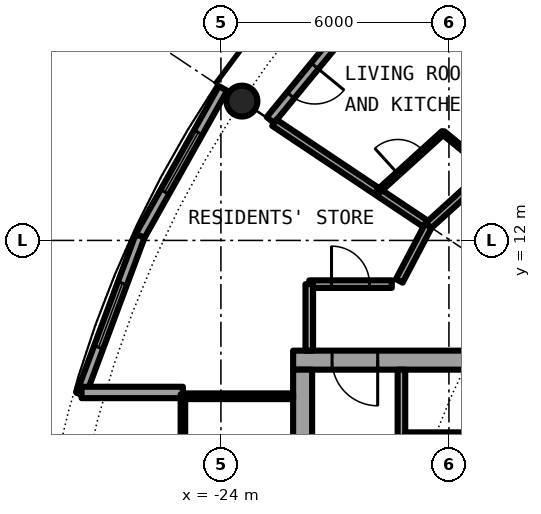
"""IFC4 building model, lengths in metres.
Left out: names, types, materials, properties, quantities, classifications, styles, units other than length and angle.
Written with IfcOpenShell. Run it as: python <this file> out.ifc"""

import sys

from ifc_helpers import new_model, si_unit, direction, frame, frame_2d, origin, origin_2d, place, context, subcontext, project, spatial, rectangle, hollow_circle, extrude, element, fill, save


model = new_model("IFC4")
c1 = context("Model", 3, precision=1e-05, world=origin(), true_north=direction((0.0, 1.0)))
c2 = subcontext(c1, "Body", "Model", "MODEL_VIEW")
j1 = project(units=[si_unit("LENGTHUNIT", "METRE"), si_unit("PLANEANGLEUNIT", "RADIAN")], contexts=[c1])
p1 = place(None, origin())
s1 = spatial("IfcSite", under=j1, at=p1, CompositionType="ELEMENT")
p2 = place(p1, origin())
s2 = spatial("IfcBuilding", under=s1, at=p2, CompositionType="ELEMENT")
p3 = place(p2, frame((0.0, 0.0, 161.6)))
s3 = spatial("IfcBuildingStorey", under=s2, at=p3, CompositionType="ELEMENT", Elevation=161.6)
p4 = place(p3, frame((-23.448, 15.667, 0.0), z_axis=(0.0, 0.0, 1.0), x_axis=(1.0, 0.0, 0.0)))
e1 = element("IfcColumn", 1, at=p4, inside=s3, PredefinedType="COLUMN", context=c2, shape_type="SweptSolid", body=[
    extrude(hollow_circle(Radius=0.406, WallThickness=0.04, at=origin_2d()), origin(), (0.0, 0.0, 1.0), 3.05),
])
p5 = place(p3, frame((-19.304, 19.304, 0.0), z_axis=(0.0, 0.0, 1.0), x_axis=(-0.634382322723, -0.773019449054, 0.0)))
e2 = element("IfcWall", 2, at=p5, inside=s3, PredefinedType="SOLIDWALL", context=c2, shape_type="SweptSolid", body=[
    extrude(rectangle(XDim=5.352, YDim=0.25, at=frame_2d((2.676, 0.0))), origin(), (0.0, 0.0, 1.0), 2.7),
])
p6 = place(p5, frame((0.441, 0.0, 0.3)))
e3 = element("IfcOpeningElement", 3, at=p6, cuts=e2, PredefinedType="OPENING", context=c2, shape_type="SweptSolid", body=[
    extrude(rectangle(XDim=1.8, YDim=2.1, at=frame_2d((0.9, 1.05))), frame((0.0, 0.135, 0.0), z_axis=(0.0, -1.0, 0.0), x_axis=(1.0, 0.0, 0.0)), (0.0, 0.0, 1.0), 0.27),
])
p7 = place(p5, frame((3.51, 0.0, 0.0)))
e4 = element("IfcOpeningElement", 4, at=p7, cuts=e2, PredefinedType="OPENING", context=c2, shape_type="SweptSolid", body=[
    extrude(rectangle(XDim=1.0, YDim=2.2, at=frame_2d((0.5, 1.1))), frame((0.0, 0.135, 0.0), z_axis=(0.0, -1.0, 0.0), x_axis=(1.0, 0.0, 0.0)), (0.0, 0.0, 1.0), 0.27),
])
p8 = place(p3, frame((-23.946, 16.0, 0.0), z_axis=(0.0, 0.0, 1.0), x_axis=(-0.489696356642, -0.871893042919, 0.0)))
e5 = element("IfcWall", 5, at=p8, inside=s3, PredefinedType="SOLIDWALL", context=c2, shape_type="SweptSolid", body=[
    extrude(rectangle(XDim=4.454, YDim=0.25, at=frame_2d((2.227, 0.0))), origin(), (0.0, 0.0, 1.0), 2.7),
])
p9 = place(p8, frame((1.327, 0.0, 0.3)))
e6 = element("IfcOpeningElement", 6, at=p9, cuts=e5, PredefinedType="OPENING", context=c2, shape_type="SweptSolid", body=[
    extrude(rectangle(XDim=1.8, YDim=2.1, at=frame_2d((0.9, 1.05))), frame((0.0, 0.135, 0.0), z_axis=(0.0, -1.0, 0.0), x_axis=(1.0, 0.0, 0.0)), (0.0, 0.0, 1.0), 0.27),
])
p10 = place(p3, frame((-26.127, 12.117, 0.0), z_axis=(0.0, 0.0, 1.0), x_axis=(-0.349247811493, -0.937030397675, 0.0)))
e7 = element("IfcWall", 7, at=p10, inside=s3, PredefinedType="SOLIDWALL", context=c2, shape_type="SweptSolid", body=[
    extrude(rectangle(XDim=4.452, YDim=0.25, at=frame_2d((2.226, 0.0))), origin(), (0.0, 0.0, 1.0), 2.7),
])
p11 = place(p10, frame((1.327, 0.0, 0.3)))
e8 = element("IfcOpeningElement", 8, at=p11, cuts=e7, PredefinedType="OPENING", context=c2, shape_type="SweptSolid", body=[
    extrude(rectangle(XDim=1.8, YDim=2.1, at=frame_2d((0.9, 1.05))), frame((0.0, 0.135, 0.0), z_axis=(0.0, -1.0, 0.0), x_axis=(1.0, 0.0, 0.0)), (0.0, 0.0, 1.0), 0.27),
])
p12 = place(p3, frame((-25.0, 8.0, 0.0), z_axis=(0.0, 0.0, 1.0), x_axis=(-1.0, 0.0, 0.0)))
e9 = element("IfcWall", 9, at=p12, inside=s3, PredefinedType="SOLIDWALL", context=c2, shape_type="SweptSolid", body=[
    extrude(rectangle(XDim=2.667, YDim=0.3, at=frame_2d((1.333, 0.0))), origin(), (0.0, 0.0, 1.0), 2.7),
])
p13 = place(p3, frame((-8.5, 8.85, 0.0), z_axis=(0.0, 0.0, 1.0), x_axis=(-1.0, 0.0, 0.0)))
e10 = element("IfcWall", 10, at=p13, inside=s3, PredefinedType="SHEAR", context=c2, shape_type="SweptSolid", body=[
    extrude(rectangle(XDim=13.6, YDim=0.5, at=frame_2d((6.8, 0.0))), origin(), (0.0, 0.0, 1.0), 3.05),
])
p14 = place(p13, frame((11.375, 0.0, 0.0)))
e11 = element("IfcOpeningElement", 11, at=p14, cuts=e10, PredefinedType="OPENING", context=c2, shape_type="SweptSolid", body=[
    extrude(rectangle(XDim=1.2, YDim=2.3, at=frame_2d((0.6, 1.15))), frame((0.0, 0.26, 0.0), z_axis=(0.0, -1.0, 0.0), x_axis=(1.0, 0.0, 0.0)), (0.0, 0.0, 1.0), 0.52),
])
p15 = place(p3, frame((-21.85, -8.6, 0.0), z_axis=(0.0, 0.0, 1.0), x_axis=(0.0, 1.0, 0.0)))
e12 = element("IfcWall", 12, at=p15, inside=s3, PredefinedType="SHEAR", context=c2, shape_type="SweptSolid", body=[
    extrude(rectangle(XDim=17.2, YDim=0.5, at=frame_2d((8.6, 0.0))), origin(), (0.0, 0.0, 1.0), 3.05),
])
p16 = place(p15, frame((7.7, 0.0, 0.0)))
e13 = element("IfcOpeningElement", 13, at=p16, cuts=e12, PredefinedType="OPENING", context=c2, shape_type="SweptSolid", body=[
    extrude(rectangle(XDim=1.8, YDim=2.3, at=frame_2d((0.9, 1.15))), frame((0.0, 0.26, 0.0), z_axis=(0.0, -1.0, 0.0), x_axis=(1.0, 0.0, 0.0)), (0.0, 0.0, 1.0), 0.52),
])
p17 = place(p3, frame((-19.25, 8.6, 0.0), z_axis=(0.0, 0.0, 1.0), x_axis=(0.0, -1.0, 0.0)))
e14 = element("IfcWall", 14, at=p17, inside=s3, PredefinedType="SOLIDWALL", context=c2, shape_type="SweptSolid", body=[
    extrude(rectangle(XDim=7.025, YDim=0.2, at=frame_2d((3.513, 0.0))), origin(), (0.0, 0.0, 1.0), 2.7),
])
p18 = place(p17, frame((2.35, 0.0, 0.0)))
e15 = element("IfcOpeningElement", 15, at=p18, cuts=e14, PredefinedType="OPENING", context=c2, shape_type="SweptSolid", body=[
    extrude(rectangle(XDim=1.1, YDim=2.3, at=frame_2d((0.55, 1.15))), frame((0.0, 0.11, 0.0), z_axis=(0.0, -1.0, 0.0), x_axis=(1.0, 0.0, 0.0)), (0.0, 0.0, 1.0), 0.22),
])
p19 = place(p3, frame((-15.45, 6.875, 0.0), z_axis=(0.0, 0.0, 1.0), x_axis=(-1.0, 0.0, 0.0)))
e16 = element("IfcWall", 16, at=p19, inside=s3, PredefinedType="PARTITIONING", context=c2, shape_type="SweptSolid", body=[
    extrude(rectangle(XDim=3.7, YDim=0.15, at=frame_2d((1.85, 0.0))), origin(), (0.0, 0.0, 1.0), 2.7),
])
p20 = place(p19, frame((1.4, 0.0, 0.0)))
e17 = element("IfcOpeningElement", 17, at=p20, cuts=e16, PredefinedType="OPENING", context=c2, shape_type="SweptSolid", body=[
    extrude(rectangle(XDim=0.9, YDim=2.3, at=frame_2d((0.45, 1.15))), frame((0.0, 0.085, 0.0), z_axis=(0.0, -1.0, 0.0), x_axis=(1.0, 0.0, 0.0)), (0.0, 0.0, 1.0), 0.17),
])
p21 = place(p3, frame((-22.1, 7.9, 0.0), z_axis=(0.0, 0.0, 1.0), x_axis=(-1.0, 0.0, 0.0)))
e18 = element("IfcWall", 18, at=p21, inside=s3, PredefinedType="PARTITIONING", context=c2, shape_type="SweptSolid", body=[
    extrude(rectangle(XDim=2.84, YDim=0.15, at=frame_2d((1.42, 0.0))), origin(), (0.0, 0.0, 1.0), 2.7),
])
p22 = place(p3, frame((-25.0, 7.95, 0.0), z_axis=(0.0, 0.0, 1.0), x_axis=(0.0, -1.0, 0.0)))
e19 = element("IfcWall", 19, at=p22, inside=s3, PredefinedType="PARTITIONING", context=c2, shape_type="SweptSolid", body=[
    extrude(rectangle(XDim=15.9, YDim=0.12, at=frame_2d((7.95, 0.0))), origin(), (0.0, 0.0, 1.0), 2.7),
])
p23 = place(p22, frame((0.95, 0.0, 0.1)))
e20 = element("IfcOpeningElement", 20, at=p23, cuts=e19, PredefinedType="OPENING", context=c2, shape_type="SweptSolid", body=[
    extrude(rectangle(XDim=14.0, YDim=2.35, at=frame_2d((7.0, 1.175))), frame((0.0, 0.07, 0.0), z_axis=(0.0, -1.0, 0.0), x_axis=(1.0, 0.0, 0.0)), (0.0, 0.0, 1.0), 0.14),
])
p24 = place(p3, frame((-22.595, 15.098, 0.0), z_axis=(0.0, 0.0, 1.0), x_axis=(0.831387096605, -0.55569370664, 0.0)))
e21 = element("IfcWall", 21, at=p24, inside=s3, PredefinedType="PARTITIONING", context=c2, shape_type="SweptSolid", body=[
    extrude(rectangle(XDim=4.875, YDim=0.2, at=frame_2d((2.438, 0.0))), origin(), (0.0, 0.0, 1.0), 2.7),
])
p25 = place(p3, frame((-19.234, 19.197, 0.0), z_axis=(0.0, 0.0, 1.0), x_axis=(0.707722727509, -0.706490297858, 0.0)))
e22 = element("IfcWall", 22, at=p25, inside=s3, PredefinedType="PARTITIONING", context=c2, shape_type="SweptSolid", body=[
    extrude(rectangle(XDim=3.962, YDim=0.1, at=frame_2d((1.981, 0.0))), origin(), (0.0, 0.0, 1.0), 2.7),
])
p26 = place(p25, frame((1.531, 0.0, 0.0)))
e23 = element("IfcOpeningElement", 23, at=p26, cuts=e22, PredefinedType="OPENING", context=c2, shape_type="SweptSolid", body=[
    extrude(rectangle(XDim=0.9, YDim=2.3, at=frame_2d((0.45, 1.15))), frame((0.0, 0.06, 0.0), z_axis=(0.0, -1.0, 0.0), x_axis=(1.0, 0.0, 0.0)), (0.0, 0.0, 1.0), 0.12),
])
p27 = place(p3, frame((-18.154, 14.834, 0.0), z_axis=(0.0, 0.0, 1.0), x_axis=(0.774345345452, -0.632763214779, 0.0)))
e24 = element("IfcWall", 24, at=p27, inside=s3, PredefinedType="PARTITIONING", context=c2, shape_type="SweptSolid", body=[
    extrude(rectangle(XDim=1.569, YDim=0.1, at=frame_2d((0.785, 0.0))), origin(), (0.0, 0.0, 1.0), 2.7),
])
p28 = place(p3, frame((-21.675, 10.85, 0.0), z_axis=(0.0, 0.0, 1.0), x_axis=(1.0, 0.0, 0.0)))
e25 = element("IfcWall", 25, at=p28, inside=s3, PredefinedType="PARTITIONING", context=c2, shape_type="SweptSolid", body=[
    extrude(rectangle(XDim=2.171, YDim=0.2, at=frame_2d((1.085, 0.0))), origin(), (0.0, 0.0, 1.0), 2.7),
])
p29 = place(p28, frame((0.585, 0.0, 0.0)))
e26 = element("IfcOpeningElement", 26, at=p29, cuts=e25, PredefinedType="OPENING", context=c2, shape_type="SweptSolid", body=[
    extrude(rectangle(XDim=1.0, YDim=2.3, at=frame_2d((0.5, 1.15))), frame((0.0, 0.11, 0.0), z_axis=(0.0, -1.0, 0.0), x_axis=(1.0, 0.0, 0.0)), (0.0, 0.0, 1.0), 0.22),
])
p30 = place(p3, frame((-18.542, 12.389, 0.0), z_axis=(0.0, 0.0, 1.0), x_axis=(0.740947367223, 0.671563101283, 0.0)))
e27 = element("IfcWall", 27, at=p30, inside=s3, PredefinedType="PARTITIONING", context=c2, shape_type="SweptSolid", body=[
    extrude(rectangle(XDim=10.837, YDim=0.2, at=frame_2d((5.419, 0.0))), origin(), (0.0, 0.0, 1.0), 2.7),
])
p31 = place(p30, frame((6.002, 0.0, 0.0)))
e28 = element("IfcOpeningElement", 28, at=p31, cuts=e27, PredefinedType="OPENING", context=c2, shape_type="SweptSolid", body=[
    extrude(rectangle(XDim=1.0, YDim=2.3, at=frame_2d((0.5, 1.15))), frame((0.0, 0.11, 0.0), z_axis=(0.0, -1.0, 0.0), x_axis=(1.0, 0.0, 0.0)), (0.0, 0.0, 1.0), 0.22),
])
p32 = place(p3, frame((-21.675, 9.1, 0.0), z_axis=(0.0, 0.0, 1.0), x_axis=(0.0, 1.0, 0.0)))
e29 = element("IfcWall", 29, at=p32, inside=s3, PredefinedType="PARTITIONING", context=c2, shape_type="SweptSolid", body=[
    extrude(rectangle(XDim=1.75, YDim=0.2, at=frame_2d((0.875, 0.0))), origin(), (0.0, 0.0, 1.0), 2.7),
])
p33 = place(p3, frame((-19.307, 10.935, 0.0), z_axis=(0.0, 0.0, 1.0), x_axis=(0.465605550524, 0.884992356646, 0.0)))
e30 = element("IfcWall", 30, at=p33, inside=s3, PredefinedType="PARTITIONING", context=c2, shape_type="SweptSolid", body=[
    extrude(rectangle(XDim=1.643, YDim=0.2, at=frame_2d((0.821, 0.0))), origin(), (0.0, 0.0, 1.0), 2.7),
])
p34 = place(p3, frame((-19.871, 13.28, 0.0), z_axis=(0.0, 0.0, 1.0), x_axis=(0.741127434804, 0.671364376014, 0.0)))
e31 = element("IfcWall", 31, at=p34, inside=s3, PredefinedType="PARTITIONING", context=c2, shape_type="SweptSolid", body=[
    extrude(rectangle(XDim=2.324, YDim=0.1, at=frame_2d((1.162, 0.0))), origin(), (0.0, 0.0, 1.0), 2.7),
])
p35 = place(p34, frame((0.709, 0.0, 0.0)))
e32 = element("IfcOpeningElement", 32, at=p35, cuts=e31, PredefinedType="OPENING", context=c2, shape_type="SweptSolid", body=[
    extrude(rectangle(XDim=0.9, YDim=2.3, at=frame_2d((0.45, 1.15))), frame((0.0, 0.06, 0.0), z_axis=(0.0, -1.0, 0.0), x_axis=(1.0, 0.0, 0.0)), (0.0, 0.0, 1.0), 0.12),
])
p36 = place(p7, origin())
e33 = element("IfcDoor", 33, at=p36, inside=s3, OperationType="SINGLE_SWING_LEFT", PredefinedType="DOOR", context=c2, shape_type="SweptSolid", body=[
    extrude(rectangle(XDim=1.0, YDim=2.2, at=frame_2d((0.5, 1.1))), frame((0.0, 0.025, 0.0), z_axis=(0.0, -1.0, 0.0), x_axis=(1.0, 0.0, 0.0)), (0.0, 0.0, 1.0), 0.05),
])
fill(e4, e33)
p37 = place(p9, origin())
e34 = element("IfcWindow", 34, at=p37, inside=s3, PartitioningType="SINGLE_PANEL", PredefinedType="WINDOW", context=c2, shape_type="SweptSolid", body=[
    extrude(rectangle(XDim=1.8, YDim=2.1, at=frame_2d((0.9, 1.05))), frame((0.0, 0.03, 0.0), z_axis=(0.0, -1.0, 0.0), x_axis=(1.0, 0.0, 0.0)), (0.0, 0.0, 1.0), 0.06),
])
fill(e6, e34)
p38 = place(p11, origin())
e35 = element("IfcWindow", 35, at=p38, inside=s3, PartitioningType="SINGLE_PANEL", PredefinedType="WINDOW", context=c2, shape_type="SweptSolid", body=[
    extrude(rectangle(XDim=1.8, YDim=2.1, at=frame_2d((0.9, 1.05))), frame((0.0, 0.03, 0.0), z_axis=(0.0, -1.0, 0.0), x_axis=(1.0, 0.0, 0.0)), (0.0, 0.0, 1.0), 0.06),
])
fill(e8, e35)
p39 = place(p20, origin())
e36 = element("IfcDoor", 36, at=p39, inside=s3, OperationType="SINGLE_SWING_LEFT", PredefinedType="DOOR", context=c2, shape_type="SweptSolid", body=[
    extrude(rectangle(XDim=0.9, YDim=2.3, at=frame_2d((0.45, 1.15))), frame((0.0, 0.025, 0.0), z_axis=(0.0, -1.0, 0.0), x_axis=(1.0, 0.0, 0.0)), (0.0, 0.0, 1.0), 0.05),
])
fill(e17, e36)
p40 = place(p14, origin())
e37 = element("IfcDoor", 37, at=p40, inside=s3, OperationType="SINGLE_SWING_LEFT", PredefinedType="DOOR", context=c2, shape_type="SweptSolid", body=[
    extrude(rectangle(XDim=1.2, YDim=2.3, at=frame_2d((0.6, 1.15))), frame((0.0, 0.025, 0.0), z_axis=(0.0, -1.0, 0.0), x_axis=(1.0, 0.0, 0.0)), (0.0, 0.0, 1.0), 0.05),
])
fill(e11, e37)
p41 = place(p23, origin())
e38 = element("IfcWindow", 38, at=p41, inside=s3, PartitioningType="SINGLE_PANEL", PredefinedType="WINDOW", context=c2, shape_type="SweptSolid", body=[
    extrude(rectangle(XDim=14.0, YDim=2.35, at=frame_2d((7.0, 1.175))), frame((0.0, 0.03, 0.0), z_axis=(0.0, -1.0, 0.0), x_axis=(1.0, 0.0, 0.0)), (0.0, 0.0, 1.0), 0.06),
])
fill(e20, e38)
p42 = place(p35, origin())
e39 = element("IfcDoor", 39, at=p42, inside=s3, OperationType="SINGLE_SWING_LEFT", PredefinedType="DOOR", context=c2, shape_type="SweptSolid", body=[
    extrude(rectangle(XDim=0.9, YDim=2.3, at=frame_2d((0.45, 1.15))), frame((0.0, 0.025, 0.0), z_axis=(0.0, -1.0, 0.0), x_axis=(1.0, 0.0, 0.0)), (0.0, 0.0, 1.0), 0.05),
])
fill(e32, e39)
p43 = place(p29, origin())
e40 = element("IfcDoor", 40, at=p43, inside=s3, OperationType="SINGLE_SWING_LEFT", PredefinedType="DOOR", context=c2, shape_type="SweptSolid", body=[
    extrude(rectangle(XDim=1.0, YDim=2.3, at=frame_2d((0.5, 1.15))), frame((0.0, 0.025, 0.0), z_axis=(0.0, -1.0, 0.0), x_axis=(1.0, 0.0, 0.0)), (0.0, 0.0, 1.0), 0.05),
])
fill(e26, e40)
save(model, sys.argv[1])
